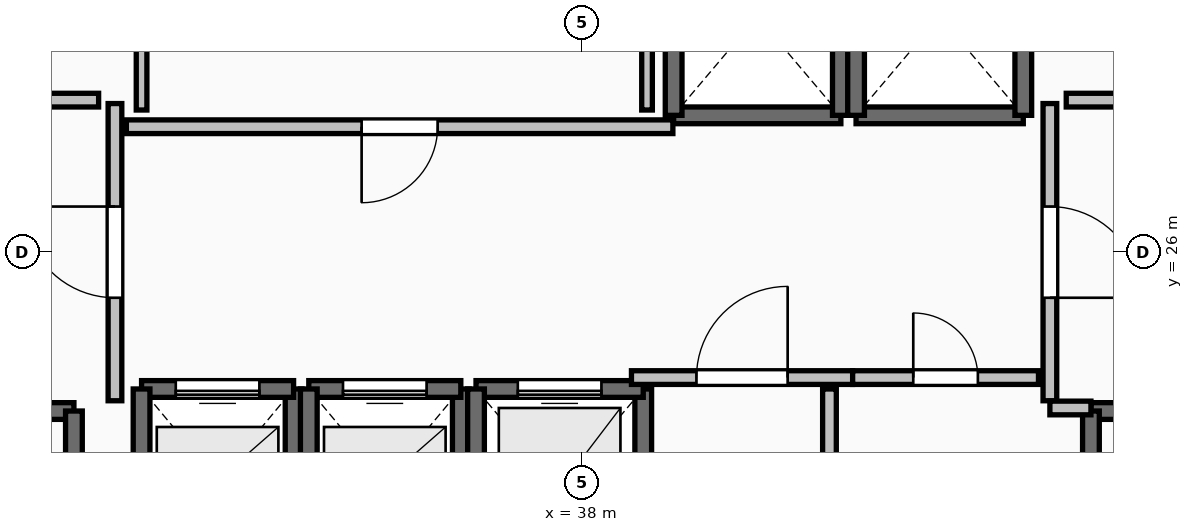
"""IFC4 building model, lengths in metres.
Left out: names, types, materials, properties, quantities, classifications, styles, units other than length and angle.
Written with IfcOpenShell. Run it as: python <this file> out.ifc"""

import sys

from ifc_helpers import new_model, si_unit, direction, frame, frame_2d, origin, place, context, subcontext, project, spatial, rectangle, extrude, element, fill, save


model = new_model("IFC4")
c1 = context("Model", 3, precision=1e-05, world=origin(), true_north=direction((0.0, 1.0)))
c2 = subcontext(c1, "Body", "Model", "MODEL_VIEW")
j1 = project(units=[si_unit("LENGTHUNIT", "METRE"), si_unit("PLANEANGLEUNIT", "RADIAN")], contexts=[c1])
p1 = place(None, origin())
s1 = spatial("IfcSite", under=j1, at=p1, CompositionType="ELEMENT")
p2 = place(p1, origin())
s2 = spatial("IfcBuilding", under=s1, at=p2, CompositionType="ELEMENT")
p3 = place(p2, frame((0.0, 0.0, 167.6)))
s3 = spatial("IfcBuildingStorey", under=s2, at=p3, CompositionType="ELEMENT", Elevation=167.6)
p4 = place(p3, frame((27.94, 23.91, 0.0), z_axis=(0.0, 0.0, 1.0), x_axis=(1.0, 0.0, 0.0)))
e1 = element("IfcWall", 1, at=p4, inside=s3, PredefinedType="SOLIDWALL", context=c2, shape_type="SweptSolid", body=[
    extrude(rectangle(XDim=3.37, YDim=0.22, at=frame_2d((1.685, 0.0))), origin(), (0.0, 0.0, 1.0), 3.24),
])
p5 = place(p4, frame((1.135, 0.0, 0.0)))
e2 = element("IfcOpeningElement", 2, at=p5, cuts=e1, PredefinedType="OPENING", context=c2, shape_type="SweptSolid", body=[
    extrude(rectangle(XDim=1.1, YDim=2.15, at=frame_2d((0.55, 1.075))), frame((0.0, 0.125, 0.0), z_axis=(0.0, -1.0, 0.0), x_axis=(1.0, 0.0, 0.0)), (0.0, 0.0, 1.0), 0.25),
])
p6 = place(p3, frame((31.31, 23.91, 0.0), z_axis=(0.0, 0.0, 1.0), x_axis=(0.0, -1.0, 0.0)))
e3 = element("IfcWall", 3, at=p6, inside=s3, PredefinedType="SOLIDWALL", context=c2, shape_type="SweptSolid", body=[
    extrude(rectangle(XDim=7.42, YDim=0.22, at=frame_2d((3.71, 0.0))), origin(), (0.0, 0.0, 1.0), 3.24),
])
p7 = place(p3, frame((44.69, 23.91, 0.0), z_axis=(0.0, 0.0, 1.0), x_axis=(1.0, 0.0, 0.0)))
e4 = element("IfcWall", 4, at=p7, inside=s3, PredefinedType="SOLIDWALL", context=c2, shape_type="SweptSolid", body=[
    extrude(rectangle(XDim=3.37, YDim=0.22, at=frame_2d((1.685, 0.0))), origin(), (0.0, 0.0, 1.0), 3.24),
])
p8 = place(p7, frame((1.135, 0.0, 0.0)))
e5 = element("IfcOpeningElement", 5, at=p8, cuts=e4, PredefinedType="OPENING", context=c2, shape_type="SweptSolid", body=[
    extrude(rectangle(XDim=1.1, YDim=2.15, at=frame_2d((0.55, 1.075))), frame((0.0, 0.125, 0.0), z_axis=(0.0, -1.0, 0.0), x_axis=(1.0, 0.0, 0.0)), (0.0, 0.0, 1.0), 0.25),
])
p9 = place(p3, frame((44.69, 16.49, 0.0), z_axis=(0.0, 0.0, 1.0), x_axis=(0.0, 1.0, 0.0)))
e6 = element("IfcWall", 6, at=p9, inside=s3, PredefinedType="SOLIDWALL", context=c2, shape_type="SweptSolid", body=[
    extrude(rectangle(XDim=7.42, YDim=0.22, at=frame_2d((3.71, 0.0))), origin(), (0.0, 0.0, 1.0), 3.24),
])
p10 = place(p3, frame((34.2, 21.8, 0.0), z_axis=(0.0, 0.0, 1.0), x_axis=(0.0, 1.0, 0.0)))
e7 = element("IfcWall", 7, at=p10, inside=s3, PredefinedType="SOLIDWALL", context=c2, shape_type="SweptSolid", body=[
    extrude(rectangle(XDim=2.4, YDim=0.22, at=frame_2d((1.2, 0.0))), origin(), (0.0, 0.0, 1.0), 3.24),
])
p11 = place(p3, frame((34.2, 24.2, 0.0), z_axis=(0.0, 0.0, 1.0), x_axis=(-1.0, 0.0, 0.0)))
e8 = element("IfcWall", 8, at=p11, inside=s3, PredefinedType="SOLIDWALL", context=c2, shape_type="SweptSolid", body=[
    extrude(rectangle(XDim=2.0, YDim=0.22, at=frame_2d((1.0, 0.0))), origin(), (0.0, 0.0, 1.0), 3.24),
])
p12 = place(p11, frame((0.45, 0.0, 0.0)))
e9 = element("IfcOpeningElement", 9, at=p12, cuts=e8, PredefinedType="OPENING", context=c2, shape_type="SweptSolid", body=[
    extrude(rectangle(XDim=1.1, YDim=2.2, at=frame_2d((0.55, 1.1))), frame((0.0, 0.125, 0.0), z_axis=(0.0, -1.0, 0.0), x_axis=(1.0, 0.0, 0.0)), (0.0, 0.0, 1.0), 0.25),
])
for number, where, z_axis, x_axis in (
    (10, (32.2, 24.2, 0.0), (0.0, 0.0, 1.0), (0.0, -1.0, 0.0)),
    (11, (36.4, 21.8, 0.0), (0.0, 0.0, 1.0), (0.0, 1.0, 0.0)),
):
    element("IfcWall", number, at=place(p3, frame(where, z_axis=z_axis, x_axis=x_axis)), inside=s3, PredefinedType="SOLIDWALL", context=c2, shape_type="SweptSolid", body=[
        extrude(rectangle(XDim=2.4, YDim=0.22, at=frame_2d((1.2, 0.0))), origin(), (0.0, 0.0, 1.0), 3.24),
    ])
p13 = place(p3, frame((36.4, 24.2, 0.0), z_axis=(0.0, 0.0, 1.0), x_axis=(-1.0, 0.0, 0.0)))
e12 = element("IfcWall", 12, at=p13, inside=s3, PredefinedType="SOLIDWALL", context=c2, shape_type="SweptSolid", body=[
    extrude(rectangle(XDim=2.0, YDim=0.22, at=frame_2d((1.0, 0.0))), origin(), (0.0, 0.0, 1.0), 3.24),
])
p14 = place(p13, frame((0.45, 0.0, 0.0)))
e13 = element("IfcOpeningElement", 13, at=p14, cuts=e12, PredefinedType="OPENING", context=c2, shape_type="SweptSolid", body=[
    extrude(rectangle(XDim=1.1, YDim=2.2, at=frame_2d((0.55, 1.1))), frame((0.0, 0.125, 0.0), z_axis=(0.0, -1.0, 0.0), x_axis=(1.0, 0.0, 0.0)), (0.0, 0.0, 1.0), 0.25),
])
p15 = place(p3, frame((34.4, 24.2, 0.0), z_axis=(0.0, 0.0, 1.0), x_axis=(0.0, -1.0, 0.0)))
e14 = element("IfcWall", 14, at=p15, inside=s3, PredefinedType="SOLIDWALL", context=c2, shape_type="SweptSolid", body=[
    extrude(rectangle(XDim=2.4, YDim=0.22, at=frame_2d((1.2, 0.0))), origin(), (0.0, 0.0, 1.0), 3.24),
])
p16 = place(p3, frame((38.8, 21.6, 0.0), z_axis=(0.0, 0.0, 1.0), x_axis=(0.0, 1.0, 0.0)))
e15 = element("IfcWall", 15, at=p16, inside=s3, PredefinedType="SOLIDWALL", context=c2, shape_type="SweptSolid", body=[
    extrude(rectangle(XDim=2.6, YDim=0.22, at=frame_2d((1.3, 0.0))), origin(), (0.0, 0.0, 1.0), 3.24),
])
p17 = place(p3, frame((38.8, 24.2, 0.0), z_axis=(0.0, 0.0, 1.0), x_axis=(-1.0, 0.0, 0.0)))
e16 = element("IfcWall", 16, at=p17, inside=s3, PredefinedType="SOLIDWALL", context=c2, shape_type="SweptSolid", body=[
    extrude(rectangle(XDim=2.2, YDim=0.22, at=frame_2d((1.1, 0.0))), origin(), (0.0, 0.0, 1.0), 3.24),
])
p18 = place(p17, frame((0.55, 0.0, 0.0)))
e17 = element("IfcOpeningElement", 17, at=p18, cuts=e16, PredefinedType="OPENING", context=c2, shape_type="SweptSolid", body=[
    extrude(rectangle(XDim=1.1, YDim=2.2, at=frame_2d((0.55, 1.1))), frame((0.0, 0.125, 0.0), z_axis=(0.0, -1.0, 0.0), x_axis=(1.0, 0.0, 0.0)), (0.0, 0.0, 1.0), 0.25),
])
p19 = place(p3, frame((36.6, 24.2, 0.0), z_axis=(0.0, 0.0, 1.0), x_axis=(0.0, -1.0, 0.0)))
e18 = element("IfcWall", 18, at=p19, inside=s3, PredefinedType="SOLIDWALL", context=c2, shape_type="SweptSolid", body=[
    extrude(rectangle(XDim=2.6, YDim=0.22, at=frame_2d((1.3, 0.0))), origin(), (0.0, 0.0, 1.0), 3.24),
])
p20 = place(p3, frame((39.2, 27.8, 0.0), z_axis=(0.0, 0.0, 1.0), x_axis=(1.0, 0.0, 0.0)))
e19 = element("IfcWall", 19, at=p20, inside=s3, PredefinedType="SOLIDWALL", context=c2, shape_type="SweptSolid", body=[
    extrude(rectangle(XDim=2.2, YDim=0.22, at=frame_2d((1.1, 0.0))), origin(), (0.0, 0.0, 1.0), 3.24),
])
for number, where, z_axis, x_axis in (
    (20, (41.4, 27.8, 0.0), (0.0, 0.0, 1.0), (0.0, 1.0, 0.0)),
    (21, (39.2, 30.4, 0.0), (0.0, 0.0, 1.0), (0.0, -1.0, 0.0)),
):
    element("IfcWall", number, at=place(p3, frame(where, z_axis=z_axis, x_axis=x_axis)), inside=s3, PredefinedType="SOLIDWALL", context=c2, shape_type="SweptSolid", body=[
        extrude(rectangle(XDim=2.6, YDim=0.22, at=frame_2d((1.3, 0.0))), origin(), (0.0, 0.0, 1.0), 3.24),
    ])
p21 = place(p3, frame((41.6, 27.8, 0.0), z_axis=(0.0, 0.0, 1.0), x_axis=(1.0, 0.0, 0.0)))
e22 = element("IfcWall", 22, at=p21, inside=s3, PredefinedType="SOLIDWALL", context=c2, shape_type="SweptSolid", body=[
    extrude(rectangle(XDim=2.2, YDim=0.22, at=frame_2d((1.1, 0.0))), origin(), (0.0, 0.0, 1.0), 3.24),
])
for number, where, z_axis, x_axis in (
    (23, (43.8, 27.8, 0.0), (0.0, 0.0, 1.0), (0.0, 1.0, 0.0)),
    (24, (41.6, 30.4, 0.0), (0.0, 0.0, 1.0), (0.0, -1.0, 0.0)),
):
    element("IfcWall", number, at=place(p3, frame(where, z_axis=z_axis, x_axis=x_axis)), inside=s3, PredefinedType="SOLIDWALL", context=c2, shape_type="SweptSolid", body=[
        extrude(rectangle(XDim=2.6, YDim=0.22, at=frame_2d((1.3, 0.0))), origin(), (0.0, 0.0, 1.0), 3.24),
    ])
p22 = place(p3, frame((31.85, 24.045, 0.0), z_axis=(0.0, 0.0, 1.0), x_axis=(0.0, 1.0, 0.0)))
e25 = element("IfcWall", 25, at=p22, inside=s3, PredefinedType="PARTITIONING", context=c2, shape_type="SweptSolid", body=[
    extrude(rectangle(XDim=3.91, YDim=0.18, at=frame_2d((1.955, 0.0))), origin(), (0.0, 0.0, 1.0), 3.24),
])
p23 = place(p22, frame((1.355, 0.0, 0.0)))
e26 = element("IfcOpeningElement", 26, at=p23, cuts=e25, PredefinedType="OPENING", context=c2, shape_type="SweptSolid", body=[
    extrude(rectangle(XDim=1.2, YDim=2.15, at=frame_2d((0.6, 1.075))), frame((0.0, 0.105, 0.0), z_axis=(0.0, -1.0, 0.0), x_axis=(1.0, 0.0, 0.0)), (0.0, 0.0, 1.0), 0.21),
])
p24 = place(p3, frame((44.15, 27.955, 0.0), z_axis=(0.0, 0.0, 1.0), x_axis=(0.0, -1.0, 0.0)))
e27 = element("IfcWall", 27, at=p24, inside=s3, PredefinedType="PARTITIONING", context=c2, shape_type="SweptSolid", body=[
    extrude(rectangle(XDim=3.91, YDim=0.18, at=frame_2d((1.955, 0.0))), origin(), (0.0, 0.0, 1.0), 3.24),
])
p25 = place(p24, frame((1.355, 0.0, 0.0)))
e28 = element("IfcOpeningElement", 28, at=p25, cuts=e27, PredefinedType="OPENING", context=c2, shape_type="SweptSolid", body=[
    extrude(rectangle(XDim=1.2, YDim=2.15, at=frame_2d((0.6, 1.075))), frame((0.0, 0.105, 0.0), z_axis=(0.0, -1.0, 0.0), x_axis=(1.0, 0.0, 0.0)), (0.0, 0.0, 1.0), 0.21),
])
p26 = place(p3, frame((44.15, 23.95, 0.0), z_axis=(0.0, 0.0, 1.0), x_axis=(1.0, 0.0, 0.0)))
e29 = element("IfcWall", 29, at=p26, inside=s3, PredefinedType="PARTITIONING", context=c2, shape_type="SweptSolid", body=[
    extrude(rectangle(XDim=0.54, YDim=0.18, at=frame_2d((0.27, 0.0))), origin(), (0.0, 0.0, 1.0), 3.24),
])
p27 = place(p3, frame((38.645, 24.35, 0.0), z_axis=(0.0, 0.0, 1.0), x_axis=(1.0, 0.0, 0.0)))
e30 = element("IfcWall", 30, at=p27, inside=s3, PredefinedType="PARTITIONING", context=c2, shape_type="SweptSolid", body=[
    extrude(rectangle(XDim=2.91, YDim=0.18, at=frame_2d((1.455, 0.0))), origin(), (0.0, 0.0, 1.0), 3.24),
])
p28 = place(p27, frame((0.855, 0.0, 0.0)))
e31 = element("IfcOpeningElement", 31, at=p28, cuts=e30, PredefinedType="OPENING", context=c2, shape_type="SweptSolid", body=[
    extrude(rectangle(XDim=1.2, YDim=2.15, at=frame_2d((0.6, 1.075))), frame((0.0, 0.105, 0.0), z_axis=(0.0, -1.0, 0.0), x_axis=(1.0, 0.0, 0.0)), (0.0, 0.0, 1.0), 0.21),
])
p29 = place(p3, frame((41.555, 24.35, 0.0), z_axis=(0.0, 0.0, 1.0), x_axis=(1.0, 0.0, 0.0)))
e32 = element("IfcWall", 32, at=p29, inside=s3, PredefinedType="PARTITIONING", context=c2, shape_type="SweptSolid", body=[
    extrude(rectangle(XDim=2.445, YDim=0.18, at=frame_2d((1.223, 0.0))), origin(), (0.0, 0.0, 1.0), 3.24),
])
p30 = place(p29, frame((0.798, 0.0, 0.0)))
e33 = element("IfcOpeningElement", 33, at=p30, cuts=e32, PredefinedType="OPENING", context=c2, shape_type="SweptSolid", body=[
    extrude(rectangle(XDim=0.85, YDim=2.1, at=frame_2d((0.425, 1.05))), frame((0.0, 0.105, 0.0), z_axis=(0.0, -1.0, 0.0), x_axis=(1.0, 0.0, 0.0)), (0.0, 0.0, 1.0), 0.21),
])
p31 = place(p3, frame((39.19, 27.65, 0.0), z_axis=(0.0, 0.0, 1.0), x_axis=(-1.0, 0.0, 0.0)))
e34 = element("IfcWall", 34, at=p31, inside=s3, PredefinedType="PARTITIONING", context=c2, shape_type="SweptSolid", body=[
    extrude(rectangle(XDim=7.19, YDim=0.18, at=frame_2d((3.595, 0.0))), origin(), (0.0, 0.0, 1.0), 3.24),
])
p32 = place(p31, frame((3.095, 0.0, 0.0)))
e35 = element("IfcOpeningElement", 35, at=p32, cuts=e34, PredefinedType="OPENING", context=c2, shape_type="SweptSolid", body=[
    extrude(rectangle(XDim=1.0, YDim=2.15, at=frame_2d((0.5, 1.075))), frame((0.0, 0.105, 0.0), z_axis=(0.0, -1.0, 0.0), x_axis=(1.0, 0.0, 0.0)), (0.0, 0.0, 1.0), 0.21),
])
p33 = place(p3, frame((41.25, 20.305, 0.0), z_axis=(0.0, 0.0, 1.0), x_axis=(0.0, 1.0, 0.0)))
e36 = element("IfcWall", 36, at=p33, inside=s3, PredefinedType="PARTITIONING", context=c2, shape_type="SweptSolid", body=[
    extrude(rectangle(XDim=3.895, YDim=0.18, at=frame_2d((1.948, 0.0))), origin(), (0.0, 0.0, 1.0), 3.24),
])
p34 = place(p33, frame((1.522, 0.0, 0.0)))
e37 = element("IfcOpeningElement", 37, at=p34, cuts=e36, PredefinedType="OPENING", context=c2, shape_type="SweptSolid", body=[
    extrude(rectangle(XDim=0.85, YDim=2.1, at=frame_2d((0.425, 1.05))), frame((0.0, 0.105, 0.0), z_axis=(0.0, -1.0, 0.0), x_axis=(1.0, 0.0, 0.0)), (0.0, 0.0, 1.0), 0.21),
])
for number, where, z_axis, x_axis in (
    (38, (31.635, 28.0, 0.0), (0.0, 0.0, 1.0), (-1.0, 0.0, 0.0)),
    (39, (45.28, 28.0, 0.0), (0.0, 0.0, 1.0), (-1.0, 0.0, 0.0)),
):
    element("IfcWall", number, at=place(p3, frame(where, z_axis=z_axis, x_axis=x_axis)), inside=s3, PredefinedType="PARTITIONING", context=c2, shape_type="SweptSolid", body=[
        extrude(rectangle(XDim=0.915, YDim=0.18, at=frame_2d((0.458, 0.0))), origin(), (0.0, 0.0, 1.0), 3.24),
    ])
for number, where, z_axis, x_axis in (
    (40, (32.2, 30.26, 0.0), (0.0, 0.0, 1.0), (0.0, -1.0, 0.0)),
    (41, (38.85, 27.87, 0.0), (0.0, 0.0, 1.0), (0.0, 1.0, 0.0)),
):
    element("IfcWall", number, at=place(p3, frame(where, z_axis=z_axis, x_axis=x_axis)), inside=s3, PredefinedType="PARTITIONING", context=c2, shape_type="SweptSolid", body=[
        extrude(rectangle(XDim=2.39, YDim=0.14, at=frame_2d((1.195, 0.0))), origin(), (0.0, 0.0, 1.0), 3.24),
    ])
p35 = place(p12, origin())
e42 = element("IfcDoor", 42, at=p35, inside=s3, OperationType="SLIDING_TO_LEFT", PredefinedType="DOOR", context=c2, shape_type="SweptSolid", body=[
    extrude(rectangle(XDim=1.1, YDim=2.2, at=frame_2d((0.55, 1.1))), frame((0.0, 0.025, 0.0), z_axis=(0.0, -1.0, 0.0), x_axis=(1.0, 0.0, 0.0)), (0.0, 0.0, 1.0), 0.05),
])
fill(e9, e42)
p36 = place(p14, origin())
e43 = element("IfcDoor", 43, at=p36, inside=s3, OperationType="SLIDING_TO_LEFT", PredefinedType="DOOR", context=c2, shape_type="SweptSolid", body=[
    extrude(rectangle(XDim=1.1, YDim=2.2, at=frame_2d((0.55, 1.1))), frame((0.0, 0.025, 0.0), z_axis=(0.0, -1.0, 0.0), x_axis=(1.0, 0.0, 0.0)), (0.0, 0.0, 1.0), 0.05),
])
fill(e13, e43)
p37 = place(p18, origin())
e44 = element("IfcDoor", 44, at=p37, inside=s3, OperationType="SLIDING_TO_LEFT", PredefinedType="DOOR", context=c2, shape_type="SweptSolid", body=[
    extrude(rectangle(XDim=1.1, YDim=2.2, at=frame_2d((0.55, 1.1))), frame((0.0, 0.025, 0.0), z_axis=(0.0, -1.0, 0.0), x_axis=(1.0, 0.0, 0.0)), (0.0, 0.0, 1.0), 0.05),
])
fill(e17, e44)
p38 = place(p23, origin())
e45 = element("IfcDoor", 45, at=p38, inside=s3, OperationType="SINGLE_SWING_RIGHT", PredefinedType="DOOR", context=c2, shape_type="SweptSolid", body=[
    extrude(rectangle(XDim=1.2, YDim=2.15, at=frame_2d((0.6, 1.075))), frame((0.0, 0.025, 0.0), z_axis=(0.0, -1.0, 0.0), x_axis=(1.0, 0.0, 0.0)), (0.0, 0.0, 1.0), 0.05),
])
fill(e26, e45)
p39 = place(p25, origin())
e46 = element("IfcDoor", 46, at=p39, inside=s3, OperationType="SINGLE_SWING_RIGHT", PredefinedType="DOOR", context=c2, shape_type="SweptSolid", body=[
    extrude(rectangle(XDim=1.2, YDim=2.15, at=frame_2d((0.6, 1.075))), frame((0.0, 0.025, 0.0), z_axis=(0.0, -1.0, 0.0), x_axis=(1.0, 0.0, 0.0)), (0.0, 0.0, 1.0), 0.05),
])
fill(e28, e46)
p40 = place(p28, origin())
e47 = element("IfcDoor", 47, at=p40, inside=s3, OperationType="SINGLE_SWING_RIGHT", PredefinedType="DOOR", context=c2, shape_type="SweptSolid", body=[
    extrude(rectangle(XDim=1.2, YDim=2.15, at=frame_2d((0.6, 1.075))), frame((0.0, 0.025, 0.0), z_axis=(0.0, -1.0, 0.0), x_axis=(1.0, 0.0, 0.0)), (0.0, 0.0, 1.0), 0.05),
])
fill(e31, e47)
p41 = place(p30, origin())
e48 = element("IfcDoor", 48, at=p41, inside=s3, OperationType="SINGLE_SWING_LEFT", PredefinedType="DOOR", context=c2, shape_type="SweptSolid", body=[
    extrude(rectangle(XDim=0.85, YDim=2.1, at=frame_2d((0.425, 1.05))), frame((0.0, 0.025, 0.0), z_axis=(0.0, -1.0, 0.0), x_axis=(1.0, 0.0, 0.0)), (0.0, 0.0, 1.0), 0.05),
])
fill(e33, e48)
p42 = place(p32, origin())
e49 = element("IfcDoor", 49, at=p42, inside=s3, OperationType="SINGLE_SWING_RIGHT", PredefinedType="DOOR", context=c2, shape_type="SweptSolid", body=[
    extrude(rectangle(XDim=1.0, YDim=2.15, at=frame_2d((0.5, 1.075))), frame((0.0, 0.025, 0.0), z_axis=(0.0, -1.0, 0.0), x_axis=(1.0, 0.0, 0.0)), (0.0, 0.0, 1.0), 0.05),
])
fill(e35, e49)
save(model, sys.argv[1])
